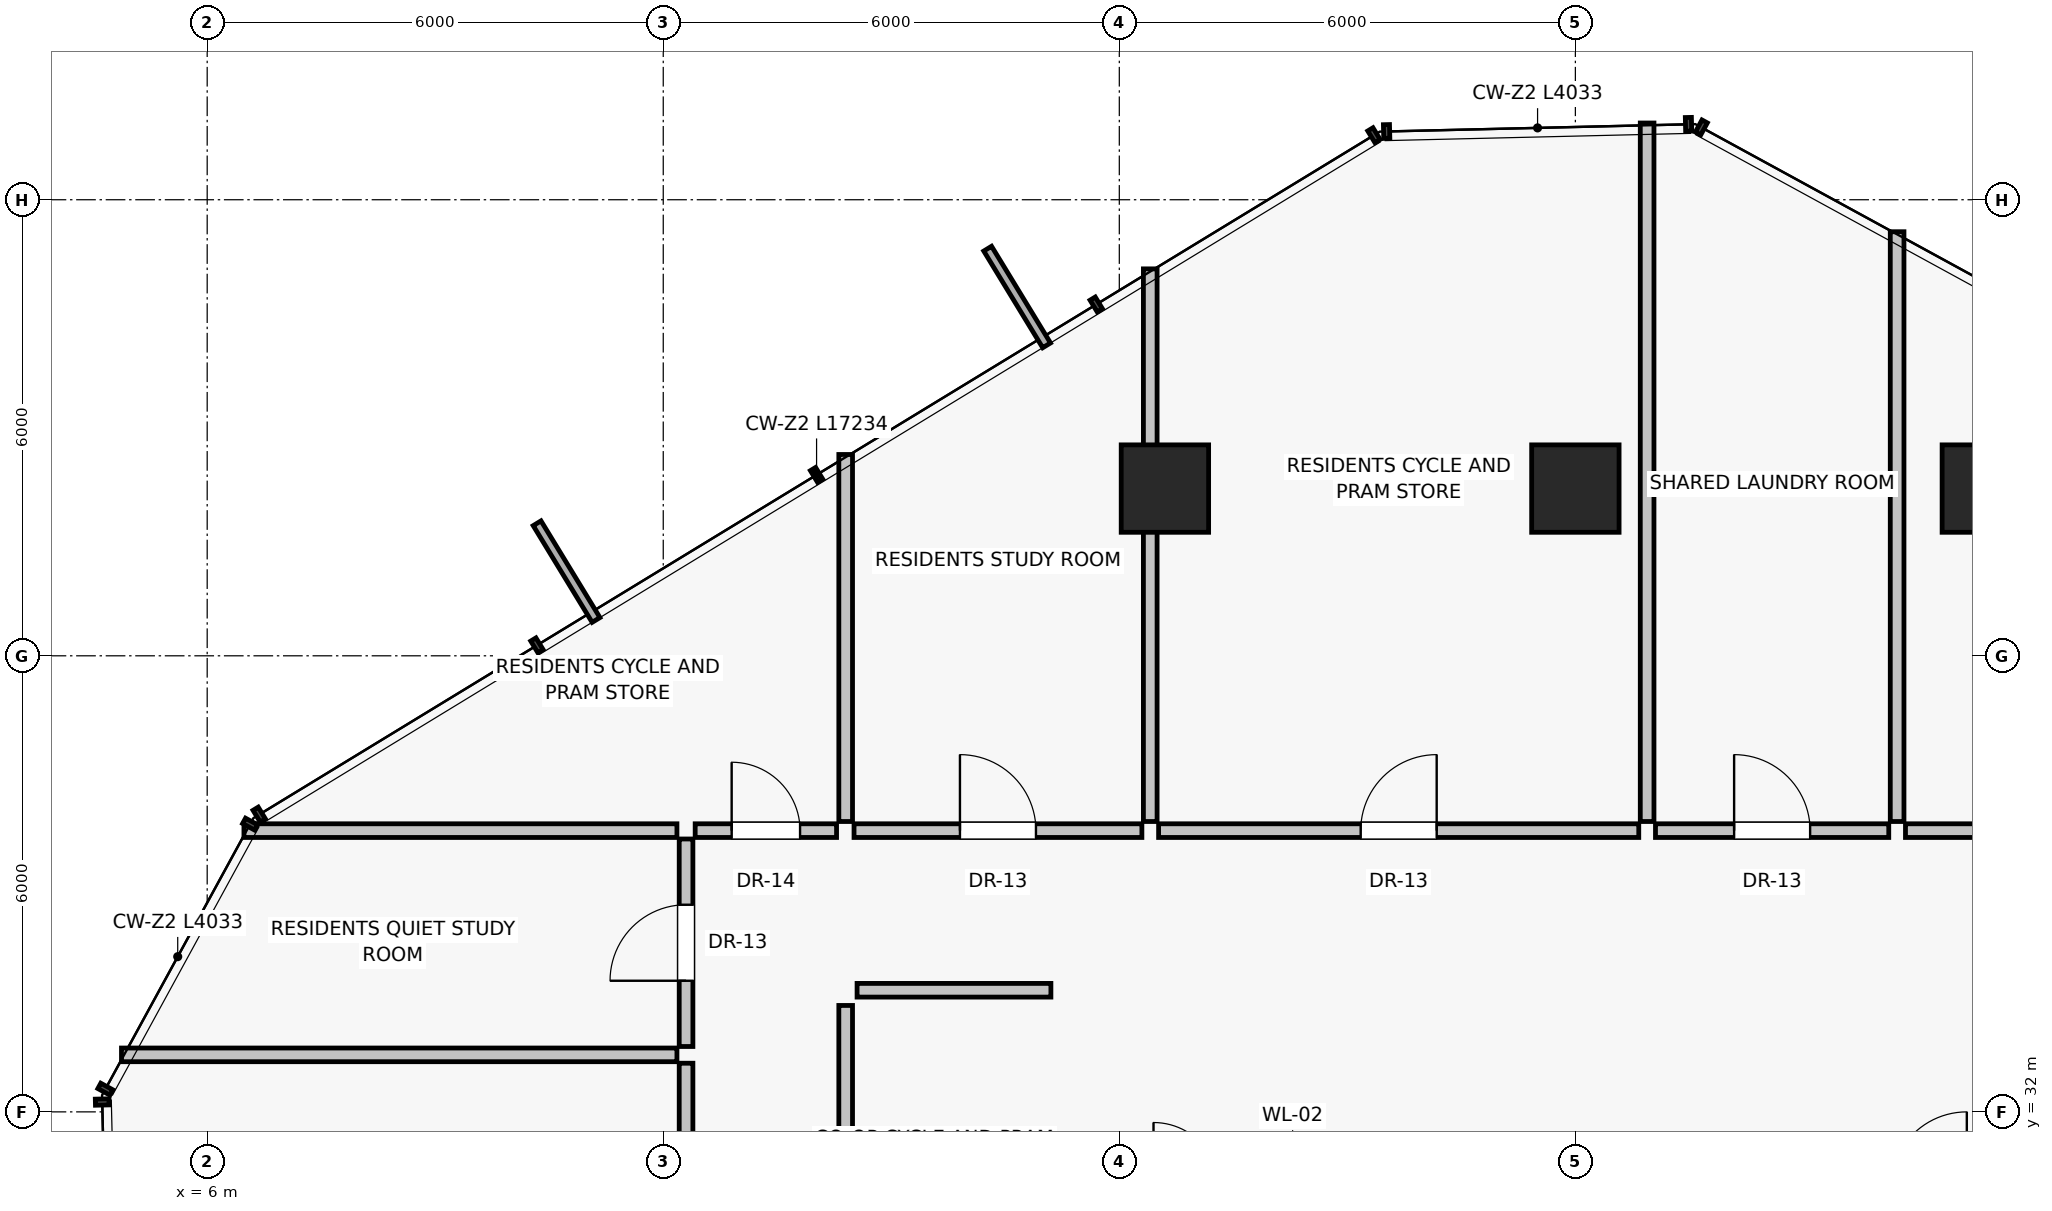
"""IFC4 building model, lengths in metres.
Left out: names, types, materials, properties, quantities, classifications, styles, units other than length and angle.
Written with IfcOpenShell. Run it as: python <this file> out.ifc"""

import sys

from ifc_helpers import new_model, si_unit, direction, frame, frame_2d, origin, origin_2d, place, context, subcontext, project, spatial, rectangle, extrude, source, transform, mapped, element, fill, save


model = new_model("IFC4")
c1 = context("Model", 3, precision=1e-05, world=origin(), true_north=direction((0.0, 1.0)))
c2 = subcontext(c1, "Body", "Model", "MODEL_VIEW")
j1 = project(units=[si_unit("LENGTHUNIT", "METRE"), si_unit("PLANEANGLEUNIT", "RADIAN")], contexts=[c1])
p1 = place(None, origin())
s1 = spatial("IfcSite", under=j1, at=p1, CompositionType="ELEMENT")
p2 = place(p1, origin())
s2 = spatial("IfcBuilding", under=s1, at=p2, CompositionType="ELEMENT")
p3 = place(p2, frame((0.0, 0.0, 132.75)))
s3 = spatial("IfcBuildingStorey", under=s2, at=p3, CompositionType="ELEMENT", Elevation=132.75)
for number, where, z_axis, x_axis in (
    (1, (29.4, 40.2, 0.0), (0.0, 0.0, 1.0), (1.0, 0.0, 0.0)),
    (2, (24.0, 40.2, 0.0), (0.0, 0.0, 1.0), (1.0, 0.0, 0.0)),
    (3, (18.6, 40.2, 0.0), (0.0, 0.0, 1.0), (1.0, 0.0, 0.0)),
):
    element("IfcColumn", number, at=place(p3, frame(where, z_axis=z_axis, x_axis=x_axis)), inside=s3, PredefinedType="COLUMN", context=c2, shape_type="SweptSolid", body=[
        extrude(rectangle(XDim=1.15, YDim=1.15, at=origin_2d()), origin(), (0.0, 0.0, 1.0), 3.25),
    ])
p4 = place(p3, frame((14.4, 24.2, 0.0), z_axis=(0.0, 0.0, 1.0), x_axis=(0.0, 1.0, 0.0)))
e4 = element("IfcWall", 4, at=p4, inside=s3, PredefinedType="PARTITIONING", context=c2, shape_type="SweptSolid", body=[
    extrude(rectangle(XDim=9.2, YDim=0.18, at=frame_2d((4.6, 0.0))), origin(), (0.0, 0.0, 1.0), 3.0),
])
p5 = place(p4, frame((3.8, 0.0, 0.0)))
e5 = element("IfcOpeningElement", 5, at=p5, cuts=e4, PredefinedType="OPENING", context=c2, shape_type="SweptSolid", body=[
    extrude(rectangle(XDim=0.9, YDim=2.01, at=frame_2d((0.45, 1.005))), frame((0.0, 0.1, 0.0), z_axis=(0.0, -1.0, 0.0), x_axis=(1.0, 0.0, 0.0)), (0.0, 0.0, 1.0), 0.2),
])
p6 = place(p3, frame((14.55, 33.6, 0.0), z_axis=(0.0, 0.0, 1.0), x_axis=(1.0, 0.0, 0.0)))
e6 = element("IfcWall", 6, at=p6, inside=s3, PredefinedType="PARTITIONING", context=c2, shape_type="SweptSolid", body=[
    extrude(rectangle(XDim=2.55, YDim=0.18, at=frame_2d((1.275, 0.0))), origin(), (0.0, 0.0, 1.0), 3.0),
])
p7 = place(p3, frame((14.4, 35.82, 0.0), z_axis=(0.0, 0.0, 1.0), x_axis=(0.0, 1.0, 0.0)))
e7 = element("IfcWall", 7, at=p7, inside=s3, PredefinedType="PARTITIONING", context=c2, shape_type="SweptSolid", body=[
    extrude(rectangle(XDim=4.829, YDim=0.18, at=frame_2d((2.414, 0.0))), origin(), (0.0, 0.0, 1.0), 3.0),
])
p8 = place(p3, frame((14.51, 35.7, 0.0), z_axis=(0.0, 0.0, 1.0), x_axis=(1.0, 0.0, 0.0)))
e8 = element("IfcWall", 8, at=p8, inside=s3, PredefinedType="PARTITIONING", context=c2, shape_type="SweptSolid", body=[
    extrude(rectangle(XDim=3.787, YDim=0.18, at=frame_2d((1.894, 0.0))), origin(), (0.0, 0.0, 1.0), 2.58),
])
p9 = place(p8, frame((1.394, 0.0, 0.0)))
e9 = element("IfcOpeningElement", 9, at=p9, cuts=e8, PredefinedType="OPENING", context=c2, shape_type="SweptSolid", body=[
    extrude(rectangle(XDim=1.0, YDim=2.01, at=frame_2d((0.5, 1.005))), frame((0.0, 0.1, 0.0), z_axis=(0.0, -1.0, 0.0), x_axis=(1.0, 0.0, 0.0)), (0.0, 0.0, 1.0), 0.2),
])
p10 = place(p3, frame((18.517, 35.7, 0.0), z_axis=(0.0, 0.0, 1.0), x_axis=(1.0, 0.0, 0.0)))
e10 = element("IfcWall", 10, at=p10, inside=s3, PredefinedType="PARTITIONING", context=c2, shape_type="SweptSolid", body=[
    extrude(rectangle(XDim=6.317, YDim=0.18, at=frame_2d((3.158, 0.0))), origin(), (0.0, 0.0, 1.0), 2.58),
])
p11 = place(p10, frame((2.658, 0.0, 0.0)))
e11 = element("IfcOpeningElement", 11, at=p11, cuts=e10, PredefinedType="OPENING", context=c2, shape_type="SweptSolid", body=[
    extrude(rectangle(XDim=1.0, YDim=2.01, at=frame_2d((0.5, 1.005))), frame((0.0, 0.1, 0.0), z_axis=(0.0, -1.0, 0.0), x_axis=(1.0, 0.0, 0.0)), (0.0, 0.0, 1.0), 0.2),
])
p12 = place(p3, frame((18.407, 35.82, 0.0), z_axis=(0.0, 0.0, 1.0), x_axis=(0.0, 1.0, 0.0)))
e12 = element("IfcWall", 12, at=p12, inside=s3, PredefinedType="PARTITIONING", context=c2, shape_type="SweptSolid", body=[
    extrude(rectangle(XDim=7.271, YDim=0.18, at=frame_2d((3.635, 0.0))), origin(), (0.0, 0.0, 1.0), 2.378),
])
p13 = place(p3, frame((24.944, 35.82, 0.0), z_axis=(0.0, 0.0, 1.0), x_axis=(0.0, 1.0, 0.0)))
e13 = element("IfcWall", 13, at=p13, inside=s3, PredefinedType="PARTITIONING", context=c2, shape_type="SweptSolid", body=[
    extrude(rectangle(XDim=9.189, YDim=0.18, at=frame_2d((4.595, 0.0))), origin(), (0.0, 0.0, 1.0), 3.0),
])
p14 = place(p3, frame((25.054, 35.7, 0.0), z_axis=(0.0, 0.0, 1.0), x_axis=(1.0, 0.0, 0.0)))
e14 = element("IfcWall", 14, at=p14, inside=s3, PredefinedType="PARTITIONING", context=c2, shape_type="SweptSolid", body=[
    extrude(rectangle(XDim=3.069, YDim=0.18, at=frame_2d((1.535, 0.0))), origin(), (0.0, 0.0, 1.0), 2.58),
])
p15 = place(p14, frame((1.034, 0.0, 0.0)))
e15 = element("IfcOpeningElement", 15, at=p15, cuts=e14, PredefinedType="OPENING", context=c2, shape_type="SweptSolid", body=[
    extrude(rectangle(XDim=1.0, YDim=2.01, at=frame_2d((0.5, 1.005))), frame((0.0, 0.1, 0.0), z_axis=(0.0, -1.0, 0.0), x_axis=(1.0, 0.0, 0.0)), (0.0, 0.0, 1.0), 0.2),
])
p16 = place(p3, frame((28.343, 35.7, 0.0), z_axis=(0.0, 0.0, 1.0), x_axis=(1.0, 0.0, 0.0)))
e16 = element("IfcWall", 16, at=p16, inside=s3, PredefinedType="PARTITIONING", context=c2, shape_type="SweptSolid", body=[
    extrude(rectangle(XDim=5.147, YDim=0.18, at=frame_2d((2.573, 0.0))), origin(), (0.0, 0.0, 1.0), 2.58),
])
p17 = place(p16, frame((2.073, 0.0, 0.0)))
e17 = element("IfcOpeningElement", 17, at=p17, cuts=e16, PredefinedType="OPENING", context=c2, shape_type="SweptSolid", body=[
    extrude(rectangle(XDim=1.0, YDim=2.01, at=frame_2d((0.5, 1.005))), frame((0.0, 0.1, 0.0), z_axis=(0.0, -1.0, 0.0), x_axis=(1.0, 0.0, 0.0)), (0.0, 0.0, 1.0), 0.2),
])
p18 = place(p3, frame((28.233, 35.82, 0.0), z_axis=(0.0, 0.0, 1.0), x_axis=(0.0, 1.0, 0.0)))
e18 = element("IfcWall", 18, at=p18, inside=s3, PredefinedType="PARTITIONING", context=c2, shape_type="SweptSolid", body=[
    extrude(rectangle(XDim=7.759, YDim=0.18, at=frame_2d((3.879, 0.0))), origin(), (0.0, 0.0, 1.0), 3.0),
])
p19 = place(p3, frame((12.18, 35.7, 0.0), z_axis=(0.0, 0.0, 1.0), x_axis=(-1.0, 0.0, 0.0)))
e19 = element("IfcWall", 19, at=p19, inside=s3, PredefinedType="PARTITIONING", context=c2, shape_type="SweptSolid", body=[
    extrude(rectangle(XDim=5.696, YDim=0.18, at=frame_2d((2.848, 0.0))), origin(), (0.0, 0.0, 1.0), 3.0),
])
p20 = place(p3, frame((12.3, 32.86, 0.0), z_axis=(0.0, 0.0, 1.0), x_axis=(0.0, 1.0, 0.0)))
e20 = element("IfcWall", 20, at=p20, inside=s3, PredefinedType="PARTITIONING", context=c2, shape_type="SweptSolid", body=[
    extrude(rectangle(XDim=2.73, YDim=0.18, at=frame_2d((1.365, 0.0))), origin(), (0.0, 0.0, 1.0), 3.0),
])
p21 = place(p20, frame((0.865, 0.0, 0.0)))
e21 = element("IfcOpeningElement", 21, at=p21, cuts=e20, PredefinedType="OPENING", context=c2, shape_type="SweptSolid", body=[
    extrude(rectangle(XDim=1.0, YDim=2.01, at=frame_2d((0.5, 1.005))), frame((0.0, 0.1, 0.0), z_axis=(0.0, -1.0, 0.0), x_axis=(1.0, 0.0, 0.0)), (0.0, 0.0, 1.0), 0.2),
])
p22 = place(p3, frame((12.18, 32.75, 0.0), z_axis=(0.0, 0.0, 1.0), x_axis=(-1.0, 0.0, 0.0)))
e22 = element("IfcWall", 22, at=p22, inside=s3, PredefinedType="PARTITIONING", context=c2, shape_type="SweptSolid", body=[
    extrude(rectangle(XDim=7.307, YDim=0.18, at=frame_2d((3.654, 0.0))), origin(), (0.0, 0.0, 1.0), 3.0),
])
p23 = place(p3, frame((12.3, 25.738, 0.0), z_axis=(0.0, 0.0, 1.0), x_axis=(0.0, 1.0, 0.0)))
e23 = element("IfcWall", 23, at=p23, inside=s3, PredefinedType="PARTITIONING", context=c2, shape_type="SweptSolid", body=[
    extrude(rectangle(XDim=6.902, YDim=0.18, at=frame_2d((3.451, 0.0))), origin(), (0.0, 0.0, 1.0), 2.58),
])
p24 = place(p23, frame((4.309, 0.0, 0.0)))
e24 = element("IfcOpeningElement", 24, at=p24, cuts=e23, PredefinedType="OPENING", context=c2, shape_type="SweptSolid", body=[
    extrude(rectangle(XDim=0.95, YDim=2.02, at=frame_2d((0.475, 1.01))), frame((0.0, 0.1, 0.0), z_axis=(0.0, -1.0, 0.0), x_axis=(1.0, 0.0, 0.0)), (0.0, 0.0, 1.0), 0.2),
])
p25 = place(p3, frame((12.42, 35.7, 0.0), z_axis=(0.0, 0.0, 1.0), x_axis=(1.0, 0.0, 0.0)))
e25 = element("IfcWall", 25, at=p25, inside=s3, PredefinedType="PARTITIONING", context=c2, shape_type="SweptSolid", body=[
    extrude(rectangle(XDim=1.86, YDim=0.18, at=frame_2d((0.93, 0.0))), origin(), (0.0, 0.0, 1.0), 3.0),
])
p26 = place(p25, frame((0.48, 0.0, 0.0)))
e26 = element("IfcOpeningElement", 26, at=p26, cuts=e25, PredefinedType="OPENING", context=c2, shape_type="SweptSolid", body=[
    extrude(rectangle(XDim=0.9, YDim=2.01, at=frame_2d((0.45, 1.005))), frame((0.0, 0.1, 0.0), z_axis=(0.0, -1.0, 0.0), x_axis=(1.0, 0.0, 0.0)), (0.0, 0.0, 1.0), 0.2),
])
m1 = source(origin(), c2, "Body", "SweptSolid", [
    extrude(rectangle(XDim=1.0, YDim=2.01, at=frame_2d((0.5, 1.005))), frame((0.0, 0.025, 0.0), z_axis=(0.0, -1.0, 0.0), x_axis=(1.0, 0.0, 0.0)), (0.0, 0.0, 1.0), 0.05),
])
p27 = place(p9, origin())
e27 = element("IfcDoor", 27, at=p27, inside=s3, OperationType="SINGLE_SWING_LEFT", PredefinedType="DOOR", context=c2, shape_type="MappedRepresentation", body=[
    mapped(m1, transform((0.0, 0.0, 0.0), scale=1.0)),
])
fill(e9, e27)
p28 = place(p11, origin())
e28 = element("IfcDoor", 28, at=p28, inside=s3, OperationType="SINGLE_SWING_RIGHT", PredefinedType="DOOR", context=c2, shape_type="MappedRepresentation", body=[
    mapped(m1, transform((0.0, 0.0, 0.0), scale=1.0)),
])
fill(e11, e28)
p29 = place(p15, origin())
e29 = element("IfcDoor", 29, at=p29, inside=s3, OperationType="SINGLE_SWING_LEFT", PredefinedType="DOOR", context=c2, shape_type="MappedRepresentation", body=[
    mapped(m1, transform((0.0, 0.0, 0.0), scale=1.0)),
])
fill(e15, e29)
p30 = place(p21, origin())
e30 = element("IfcDoor", 30, at=p30, inside=s3, OperationType="SINGLE_SWING_LEFT", PredefinedType="DOOR", context=c2, shape_type="MappedRepresentation", body=[
    mapped(m1, transform((0.0, 0.0, 0.0), scale=1.0)),
])
fill(e21, e30)
m2 = source(origin(), c2, "Body", "SweptSolid", [
    extrude(rectangle(XDim=0.9, YDim=2.01, at=frame_2d((0.45, 1.005))), frame((0.0, 0.025, 0.0), z_axis=(0.0, -1.0, 0.0), x_axis=(1.0, 0.0, 0.0)), (0.0, 0.0, 1.0), 0.05),
])
p31 = place(p26, origin())
e31 = element("IfcDoor", 31, at=p31, inside=s3, OperationType="SINGLE_SWING_LEFT", PredefinedType="DOOR", context=c2, shape_type="MappedRepresentation", body=[
    mapped(m2, transform((0.0, 0.0, 0.0), scale=1.0)),
])
fill(e26, e31)
save(model, sys.argv[1])
